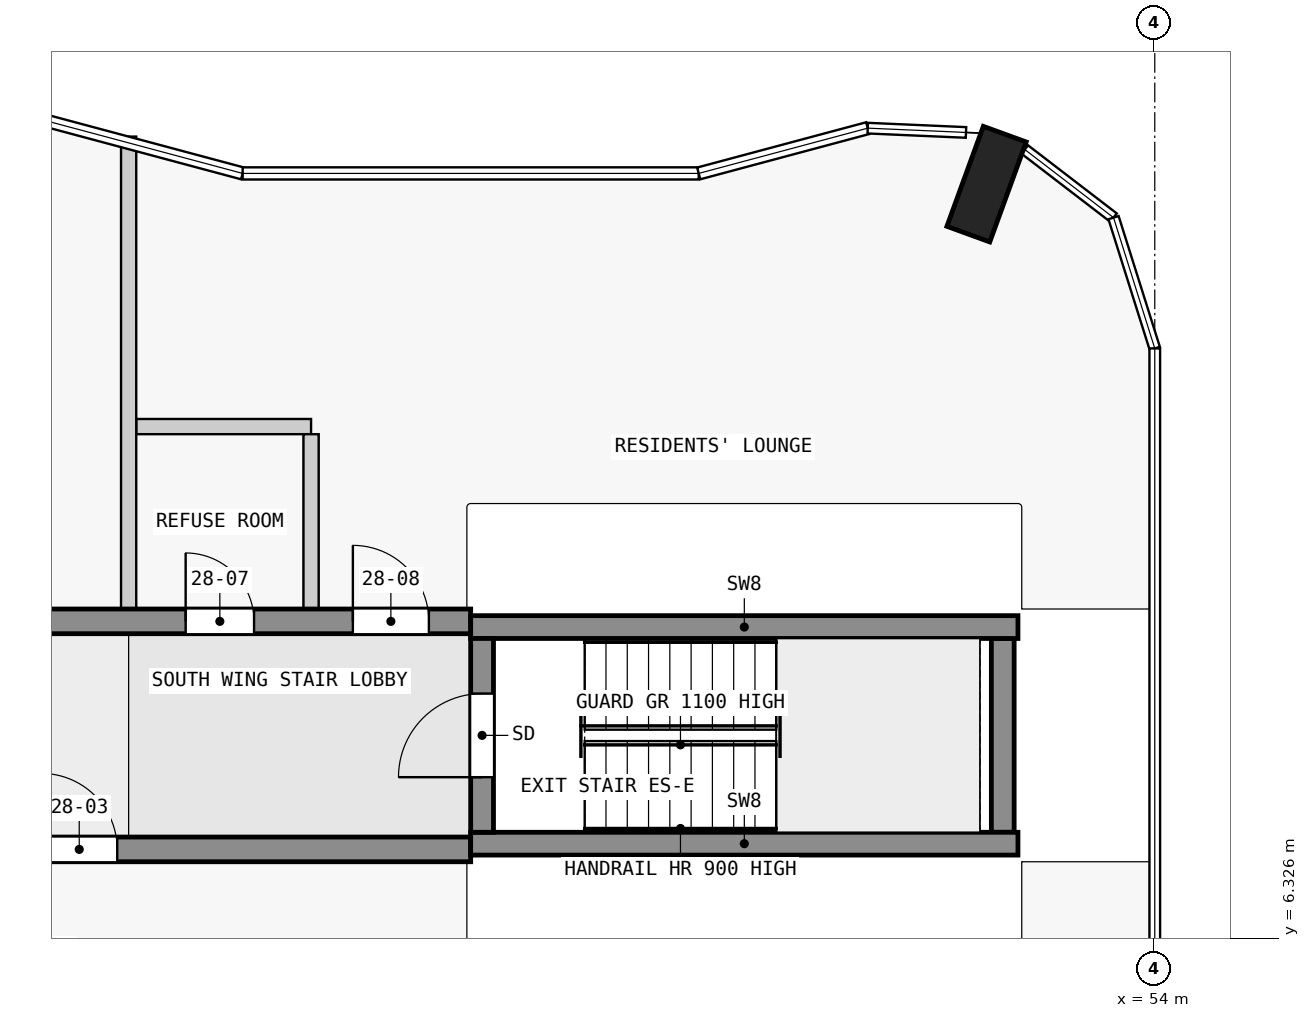
"""IFC4 building model, lengths in metres.
Left out: names, types, materials, properties, quantities, classifications, styles, units other than length and angle.
Written with IfcOpenShell. Run it as: python <this file> out.ifc"""

import sys

from ifc_helpers import new_model, si_unit, direction, frame, frame_2d, origin, origin_2d, place, context, subcontext, project, spatial, rectangle, extrude, element, fill, save


model = new_model("IFC4")
c1 = context("Model", 3, precision=1e-05, world=origin(), true_north=direction((0.0, 1.0)))
c2 = subcontext(c1, "Body", "Model", "MODEL_VIEW")
j1 = project(units=[si_unit("LENGTHUNIT", "METRE"), si_unit("PLANEANGLEUNIT", "RADIAN")], contexts=[c1])
p1 = place(None, origin())
s1 = spatial("IfcSite", under=j1, at=p1, CompositionType="ELEMENT")
p2 = place(p1, origin())
s2 = spatial("IfcBuilding", under=s1, at=p2, CompositionType="ELEMENT")
p3 = place(p2, frame((0.0, 0.0, 109.8)))
s3 = spatial("IfcBuildingStorey", under=s2, at=p3, CompositionType="ELEMENT", Elevation=109.8)
p4 = place(p3, frame((51.787, 16.252, 0.0), z_axis=(0.0, 0.0, 1.0), x_axis=(-0.939664280925, 0.342097996418, 0.0)))
e1 = element("IfcColumn", 1, at=p4, inside=s3, PredefinedType="COLUMN", context=c2, shape_type="SweptSolid", body=[
    extrude(rectangle(XDim=0.6, YDim=1.4, at=origin_2d()), origin(), (0.0, 0.0, 1.0), 3.5),
])
p5 = place(p3, frame((45.15, 7.725, 0.0), z_axis=(0.0, 0.0, 1.0), x_axis=(0.0, 1.0, 0.0)))
e2 = element("IfcWall", 2, at=p5, inside=s3, PredefinedType="SHEAR", context=c2, shape_type="SweptSolid", body=[
    extrude(rectangle(XDim=2.55, YDim=0.3, at=frame_2d((1.275, 0.0))), origin(), (0.0, 0.0, 1.0), 3.5),
])
p6 = place(p5, frame((0.725, 0.0, 0.0)))
e3 = element("IfcOpeningElement", 3, at=p6, cuts=e2, PredefinedType="OPENING", context=c2, shape_type="SweptSolid", body=[
    extrude(rectangle(XDim=1.1, YDim=2.1, at=frame_2d((0.55, 1.05))), frame((0.0, 0.16, 0.0), z_axis=(0.0, -1.0, 0.0), x_axis=(1.0, 0.0, 0.0)), (0.0, 0.0, 1.0), 0.32),
])
p7 = place(p3, frame((52.0, 7.725, 0.0), z_axis=(0.0, 0.0, 1.0), x_axis=(0.0, 1.0, 0.0)))
e4 = element("IfcWall", 4, at=p7, inside=s3, PredefinedType="SHEAR", context=c2, shape_type="SweptSolid", body=[
    extrude(rectangle(XDim=2.55, YDim=0.3, at=frame_2d((1.275, 0.0))), origin(), (0.0, 0.0, 1.0), 3.5),
])
for number, where, z_axis, x_axis in (
    (5, (45.0, 7.575, 0.0), (0.0, 0.0, 1.0), (1.0, 0.0, 0.0)),
    (6, (45.0, 10.425, 0.0), (0.0, 0.0, 1.0), (1.0, 0.0, 0.0)),
):
    element("IfcWall", number, at=place(p3, frame(where, z_axis=z_axis, x_axis=x_axis)), inside=s3, PredefinedType="SHEAR", context=c2, shape_type="SweptSolid", body=[
        extrude(rectangle(XDim=7.2, YDim=0.3, at=frame_2d((3.6, 0.0))), origin(), (0.0, 0.0, 1.0), 3.5),
    ])
p8 = place(p3, frame((22.5, 7.5, 0.0), z_axis=(0.0, 0.0, 1.0), x_axis=(1.0, 0.0, 0.0)))
e7 = element("IfcWall", 7, at=p8, inside=s3, PredefinedType="SHEAR", context=c2, shape_type="SweptSolid", body=[
    extrude(rectangle(XDim=22.5, YDim=0.325, at=frame_2d((11.25, 0.0))), origin(), (0.0, 0.0, 1.0), 3.25),
])
p9 = place(p8, frame((4.05, 0.0, 0.0)))
e8 = element("IfcOpeningElement", 8, at=p9, cuts=e7, PredefinedType="OPENING", context=c2, shape_type="SweptSolid", body=[
    extrude(rectangle(XDim=1.0, YDim=2.1, at=frame_2d((0.5, 1.05))), frame((0.0, 0.172, 0.0), z_axis=(0.0, -1.0, 0.0), x_axis=(1.0, 0.0, 0.0)), (0.0, 0.0, 1.0), 0.345),
])
p10 = place(p8, frame((10.75, 0.0, 0.0)))
e9 = element("IfcOpeningElement", 9, at=p10, cuts=e7, PredefinedType="OPENING", context=c2, shape_type="SweptSolid", body=[
    extrude(rectangle(XDim=1.0, YDim=2.1, at=frame_2d((0.5, 1.05))), frame((0.0, 0.172, 0.0), z_axis=(0.0, -1.0, 0.0), x_axis=(1.0, 0.0, 0.0)), (0.0, 0.0, 1.0), 0.345),
])
p11 = place(p8, frame((16.85, 0.0, 0.0)))
e10 = element("IfcOpeningElement", 10, at=p11, cuts=e7, PredefinedType="OPENING", context=c2, shape_type="SweptSolid", body=[
    extrude(rectangle(XDim=1.0, YDim=2.1, at=frame_2d((0.5, 1.05))), frame((0.0, 0.172, 0.0), z_axis=(0.0, -1.0, 0.0), x_axis=(1.0, 0.0, 0.0)), (0.0, 0.0, 1.0), 0.345),
])
p12 = place(p3, frame((22.5, 10.5, 0.0), z_axis=(0.0, 0.0, 1.0), x_axis=(1.0, 0.0, 0.0)))
e11 = element("IfcWall", 11, at=p12, inside=s3, PredefinedType="SHEAR", context=c2, shape_type="SweptSolid", body=[
    extrude(rectangle(XDim=22.5, YDim=0.325, at=frame_2d((11.25, 0.0))), origin(), (0.0, 0.0, 1.0), 3.25),
])
p13 = place(p12, frame((1.85, 0.0, 0.0)))
e12 = element("IfcOpeningElement", 12, at=p13, cuts=e11, PredefinedType="OPENING", context=c2, shape_type="SweptSolid", body=[
    extrude(rectangle(XDim=0.9, YDim=2.1, at=frame_2d((0.45, 1.05))), frame((0.0, 0.172, 0.0), z_axis=(0.0, -1.0, 0.0), x_axis=(1.0, 0.0, 0.0)), (0.0, 0.0, 1.0), 0.345),
])
p14 = place(p12, frame((6.25, 0.0, 0.0)))
e13 = element("IfcOpeningElement", 13, at=p14, cuts=e11, PredefinedType="OPENING", context=c2, shape_type="SweptSolid", body=[
    extrude(rectangle(XDim=1.0, YDim=2.1, at=frame_2d((0.5, 1.05))), frame((0.0, 0.172, 0.0), z_axis=(0.0, -1.0, 0.0), x_axis=(1.0, 0.0, 0.0)), (0.0, 0.0, 1.0), 0.345),
])
p15 = place(p12, frame((13.05, 0.0, 0.0)))
e14 = element("IfcOpeningElement", 14, at=p15, cuts=e11, PredefinedType="OPENING", context=c2, shape_type="SweptSolid", body=[
    extrude(rectangle(XDim=1.0, YDim=2.1, at=frame_2d((0.5, 1.05))), frame((0.0, 0.172, 0.0), z_axis=(0.0, -1.0, 0.0), x_axis=(1.0, 0.0, 0.0)), (0.0, 0.0, 1.0), 0.345),
])
p16 = place(p12, frame((18.75, 0.0, 0.0)))
e15 = element("IfcOpeningElement", 15, at=p16, cuts=e11, PredefinedType="OPENING", context=c2, shape_type="SweptSolid", body=[
    extrude(rectangle(XDim=0.9, YDim=2.1, at=frame_2d((0.45, 1.05))), frame((0.0, 0.172, 0.0), z_axis=(0.0, -1.0, 0.0), x_axis=(1.0, 0.0, 0.0)), (0.0, 0.0, 1.0), 0.345),
])
p17 = place(p12, frame((20.95, 0.0, 0.0)))
e16 = element("IfcOpeningElement", 16, at=p17, cuts=e11, PredefinedType="OPENING", context=c2, shape_type="SweptSolid", body=[
    extrude(rectangle(XDim=1.0, YDim=2.1, at=frame_2d((0.5, 1.05))), frame((0.0, 0.172, 0.0), z_axis=(0.0, -1.0, 0.0), x_axis=(1.0, 0.0, 0.0)), (0.0, 0.0, 1.0), 0.345),
])
p18 = place(p3, frame((42.9, 13.062, 0.0), z_axis=(0.0, 0.0, 1.0), x_axis=(-1.0, 0.0, 0.0)))
e17 = element("IfcWall", 17, at=p18, inside=s3, PredefinedType="PARTITIONING", context=c2, shape_type="SweptSolid", body=[
    extrude(rectangle(XDim=2.3, YDim=0.2, at=frame_2d((1.15, 0.0))), origin(), (0.0, 0.0, 1.0), 3.25),
])
p19 = place(p3, frame((40.5, 10.663, 0.0), z_axis=(0.0, 0.0, 1.0), x_axis=(0.0, 1.0, 0.0)))
e18 = element("IfcWall", 18, at=p19, inside=s3, PredefinedType="PARTITIONING", context=c2, shape_type="SweptSolid", body=[
    extrude(rectangle(XDim=6.215, YDim=0.2, at=frame_2d((3.107, 0.0))), origin(), (0.0, 0.0, 1.0), 3.25),
])
p20 = place(p3, frame((42.9, 10.663, 0.0), z_axis=(0.0, 0.0, 1.0), x_axis=(0.0, 1.0, 0.0)))
e19 = element("IfcWall", 19, at=p20, inside=s3, PredefinedType="PARTITIONING", context=c2, shape_type="SweptSolid", body=[
    extrude(rectangle(XDim=2.3, YDim=0.2, at=frame_2d((1.15, 0.0))), origin(), (0.0, 0.0, 1.0), 3.25),
])
p21 = place(p6, origin())
e20 = element("IfcDoor", 20, at=p21, inside=s3, OperationType="SINGLE_SWING_LEFT", PredefinedType="DOOR", context=c2, shape_type="SweptSolid", body=[
    extrude(rectangle(XDim=1.1, YDim=2.1, at=frame_2d((0.55, 1.05))), frame((0.0, 0.025, 0.0), z_axis=(0.0, -1.0, 0.0), x_axis=(1.0, 0.0, 0.0)), (0.0, 0.0, 1.0), 0.05),
])
fill(e3, e20)
p22 = place(p11, origin())
e21 = element("IfcDoor", 21, at=p22, inside=s3, OperationType="SINGLE_SWING_RIGHT", PredefinedType="DOOR", context=c2, shape_type="SweptSolid", body=[
    extrude(rectangle(XDim=1.0, YDim=2.1, at=frame_2d((0.5, 1.05))), frame((0.0, 0.025, 0.0), z_axis=(0.0, -1.0, 0.0), x_axis=(1.0, 0.0, 0.0)), (0.0, 0.0, 1.0), 0.05),
])
fill(e10, e21)
p23 = place(p16, origin())
e22 = element("IfcDoor", 22, at=p23, inside=s3, OperationType="SINGLE_SWING_RIGHT", PredefinedType="DOOR", context=c2, shape_type="SweptSolid", body=[
    extrude(rectangle(XDim=0.9, YDim=2.1, at=frame_2d((0.45, 1.05))), frame((0.0, 0.025, 0.0), z_axis=(0.0, -1.0, 0.0), x_axis=(1.0, 0.0, 0.0)), (0.0, 0.0, 1.0), 0.05),
])
fill(e15, e22)
p24 = place(p17, origin())
e23 = element("IfcDoor", 23, at=p24, inside=s3, OperationType="SINGLE_SWING_RIGHT", PredefinedType="DOOR", context=c2, shape_type="SweptSolid", body=[
    extrude(rectangle(XDim=1.0, YDim=2.1, at=frame_2d((0.5, 1.05))), frame((0.0, 0.025, 0.0), z_axis=(0.0, -1.0, 0.0), x_axis=(1.0, 0.0, 0.0)), (0.0, 0.0, 1.0), 0.05),
])
fill(e16, e23)
save(model, sys.argv[1])
